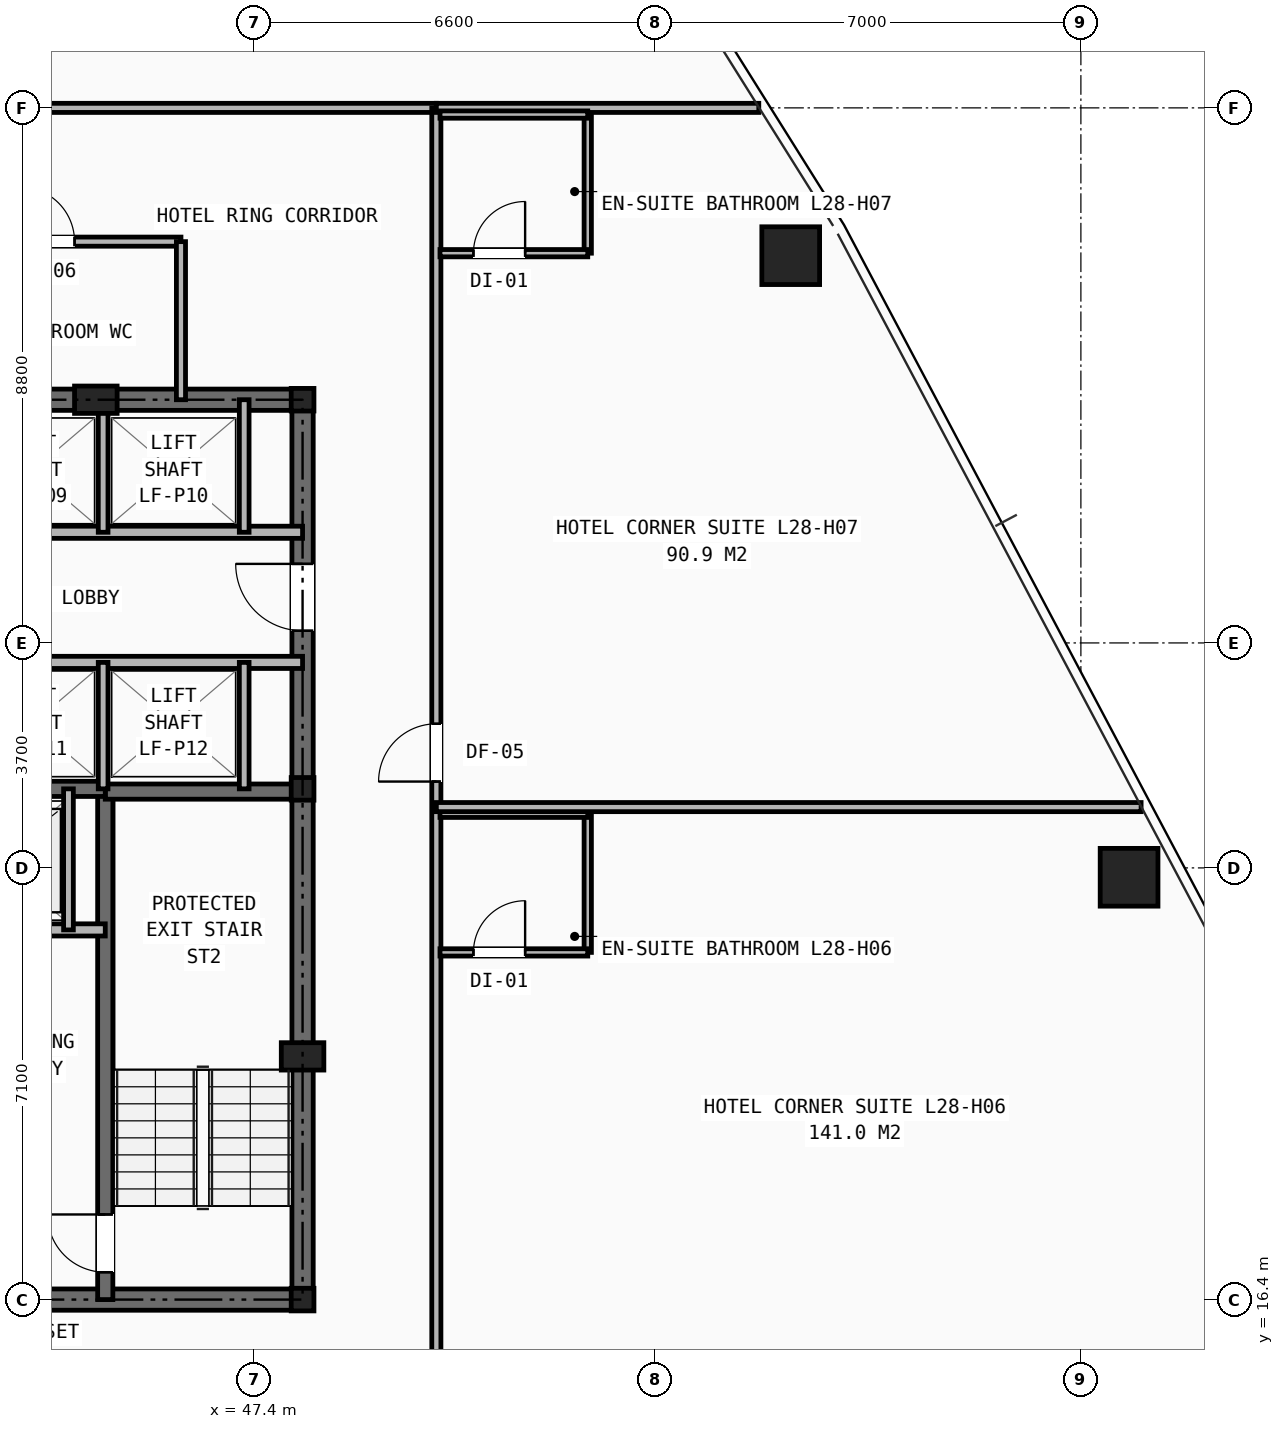
"""IFC4 building model, lengths in metres.
Left out: names, types, materials, properties, quantities, classifications, styles, units other than length and angle.
Written with IfcOpenShell. Run it as: python <this file> out.ifc"""

import sys

from ifc_helpers import new_model, si_unit, direction, frame, frame_2d, origin, origin_2d, place, context, subcontext, project, spatial, rectangle, hollow_rectangle, i_section, extrude, element, fill, save


model = new_model("IFC4")
c1 = context("Model", 3, precision=1e-05, world=origin(), true_north=direction((0.0, 1.0)))
c2 = subcontext(c1, "Body", "Model", "MODEL_VIEW")
j1 = project(units=[si_unit("LENGTHUNIT", "METRE"), si_unit("PLANEANGLEUNIT", "RADIAN")], contexts=[c1])
p1 = place(None, origin())
s1 = spatial("IfcSite", under=j1, at=p1, CompositionType="ELEMENT")
p2 = place(p1, origin())
s2 = spatial("IfcBuilding", under=s1, at=p2, CompositionType="ELEMENT")
p3 = place(p2, frame((0.0, 0.0, 99.0)))
s3 = spatial("IfcBuildingStorey", under=s2, at=p3, CompositionType="ELEMENT", Elevation=99.0)
for number, where, z_axis, x_axis in (
    (1, (48.2, 16.4, 0.0), (0.0, 0.0, 1.0), (1.0, 0.0, 0.0)),
    (2, (48.2, 24.8, 0.0), (0.0, 0.0, 1.0), (1.0, 0.0, 0.0)),
    (3, (48.2, 31.2, 0.0), (0.0, 0.0, 1.0), (1.0, 0.0, 0.0)),
):
    element("IfcColumn", number, at=place(p3, frame(where, z_axis=z_axis, x_axis=x_axis)), inside=s3, PredefinedType="COLUMN", context=c2, shape_type="SweptSolid", body=[
        extrude(i_section(OverallWidth=0.374, OverallDepth=0.372, WebThickness=0.016, FlangeThickness=0.026, at=origin_2d()), origin(), (0.0, 0.0, 1.0), 3.2),
    ])
for number, where, z_axis, x_axis in (
    (4, (48.2, 20.4, 0.0), (0.0, 0.0, 1.0), (1.0, 0.0, 0.0)),
    (5, (44.8, 31.2, 0.0), (0.0, 0.0, 1.0), (1.0, 0.0, 0.0)),
):
    element("IfcColumn", number, at=place(p3, frame(where, z_axis=z_axis, x_axis=x_axis)), inside=s3, PredefinedType="PILASTER", context=c2, shape_type="SweptSolid", body=[
        extrude(rectangle(XDim=0.7, YDim=0.45, at=origin_2d()), origin(), (0.0, 0.0, 1.0), 3.2),
    ])
for number, where, z_axis, x_axis in (
    (6, (61.792, 23.346, 0.0), (0.0, 0.0, 1.0), (1.0, 0.0, 0.0)),
    (7, (56.228, 33.569, 0.0), (0.0, 0.0, 1.0), (1.0, 0.0, 0.0)),
):
    element("IfcColumn", number, at=place(p3, frame(where, z_axis=z_axis, x_axis=x_axis)), inside=s3, PredefinedType="COLUMN", context=c2, shape_type="SweptSolid", body=[
        extrude(hollow_rectangle(XDim=0.95, YDim=0.95, WallThickness=0.065, at=origin_2d()), origin(), (0.0, 0.0, 1.0), 3.2),
    ])
p4 = place(p3, frame((31.8, 16.4, 0.0), z_axis=(0.0, 0.0, 1.0), x_axis=(1.0, 0.0, 0.0)))
e8 = element("IfcWall", 8, at=p4, inside=s3, PredefinedType="SHEAR", context=c2, shape_type="SweptSolid", body=[
    extrude(rectangle(XDim=16.4, YDim=0.35, at=frame_2d((8.2, 0.0))), origin(), (0.0, 0.0, 1.0), 2.97),
])
p5 = place(p4, frame((4.2, 0.0, 0.0)))
e9 = element("IfcOpeningElement", 9, at=p5, cuts=e8, PredefinedType="OPENING", context=c2, shape_type="SweptSolid", body=[
    extrude(rectangle(XDim=0.95, YDim=2.1, at=frame_2d((0.475, 1.05))), frame((0.0, 0.185, 0.0), z_axis=(0.0, -1.0, 0.0), x_axis=(1.0, 0.0, 0.0)), (0.0, 0.0, 1.0), 0.37),
])
p6 = place(p4, frame((10.6, 0.0, 0.0)))
e10 = element("IfcOpeningElement", 10, at=p6, cuts=e8, PredefinedType="OPENING", context=c2, shape_type="SweptSolid", body=[
    extrude(rectangle(XDim=0.95, YDim=2.1, at=frame_2d((0.475, 1.05))), frame((0.0, 0.185, 0.0), z_axis=(0.0, -1.0, 0.0), x_axis=(1.0, 0.0, 0.0)), (0.0, 0.0, 1.0), 0.37),
])
p7 = place(p3, frame((31.8, 31.2, 0.0), z_axis=(0.0, 0.0, 1.0), x_axis=(1.0, 0.0, 0.0)))
e11 = element("IfcWall", 11, at=p7, inside=s3, PredefinedType="SHEAR", context=c2, shape_type="SweptSolid", body=[
    extrude(rectangle(XDim=16.4, YDim=0.35, at=frame_2d((8.2, 0.0))), origin(), (0.0, 0.0, 1.0), 2.97),
])
p8 = place(p3, frame((48.2, 16.4, 0.0), z_axis=(0.0, 0.0, 1.0), x_axis=(0.0, 1.0, 0.0)))
e12 = element("IfcWall", 12, at=p8, inside=s3, PredefinedType="SHEAR", context=c2, shape_type="SweptSolid", body=[
    extrude(rectangle(XDim=14.8, YDim=0.35, at=frame_2d((7.4, 0.0))), origin(), (0.0, 0.0, 1.0), 2.97),
])
p9 = place(p8, frame((11.0, 0.0, 0.0)))
e13 = element("IfcOpeningElement", 13, at=p9, cuts=e12, PredefinedType="OPENING", context=c2, shape_type="SweptSolid", body=[
    extrude(rectangle(XDim=1.1, YDim=2.15, at=frame_2d((0.55, 1.075))), frame((0.0, 0.185, 0.0), z_axis=(0.0, -1.0, 0.0), x_axis=(1.0, 0.0, 0.0)), (0.0, 0.0, 1.0), 0.37),
])
p10 = place(p3, frame((44.955, 16.4, 0.0), z_axis=(0.0, 0.0, 1.0), x_axis=(0.0, 1.0, 0.0)))
e14 = element("IfcWall", 14, at=p10, inside=s3, PredefinedType="SHEAR", context=c2, shape_type="SweptSolid", body=[
    extrude(rectangle(XDim=8.4, YDim=0.25, at=frame_2d((4.2, 0.0))), origin(), (0.0, 0.0, 1.0), 2.97),
])
p11 = place(p10, frame((0.45, 0.0, 0.0)))
e15 = element("IfcOpeningElement", 15, at=p11, cuts=e14, PredefinedType="OPENING", context=c2, shape_type="SweptSolid", body=[
    extrude(rectangle(XDim=0.95, YDim=2.1, at=frame_2d((0.475, 1.05))), frame((0.0, 0.135, 0.0), z_axis=(0.0, -1.0, 0.0), x_axis=(1.0, 0.0, 0.0)), (0.0, 0.0, 1.0), 0.27),
])
p12 = place(p3, frame((44.955, 24.755, 0.0), z_axis=(0.0, 0.0, 1.0), x_axis=(1.0, 0.0, 0.0)))
e16 = element("IfcWall", 16, at=p12, inside=s3, PredefinedType="SHEAR", context=c2, shape_type="SweptSolid", body=[
    extrude(rectangle(XDim=3.245, YDim=0.25, at=frame_2d((1.623, 0.0))), origin(), (0.0, 0.0, 1.0), 2.97),
])
p13 = place(p3, frame((35.045, 24.8, 0.0), z_axis=(0.0, 0.0, 1.0), x_axis=(1.0, 0.0, 0.0)))
e17 = element("IfcWall", 17, at=p13, inside=s3, PredefinedType="SHEAR", context=c2, shape_type="SweptSolid", body=[
    extrude(rectangle(XDim=9.91, YDim=0.25, at=frame_2d((4.955, 0.0))), origin(), (0.0, 0.0, 1.0), 2.97),
])
p14 = place(p3, frame((35.045, 22.48, 0.0), z_axis=(0.0, 0.0, 1.0), x_axis=(1.0, 0.0, 0.0)))
e18 = element("IfcWall", 18, at=p14, inside=s3, PredefinedType="SOLIDWALL", context=c2, shape_type="SweptSolid", body=[
    extrude(rectangle(XDim=9.91, YDim=0.2, at=frame_2d((4.955, 0.0))), origin(), (0.0, 0.0, 1.0), 2.97),
])
p15 = place(p14, frame((1.255, 0.0, 0.0)))
e19 = element("IfcOpeningElement", 19, at=p15, cuts=e18, PredefinedType="OPENING", context=c2, shape_type="SweptSolid", body=[
    extrude(rectangle(XDim=1.1, YDim=2.15, at=frame_2d((0.55, 1.075))), frame((0.0, 0.11, 0.0), z_axis=(0.0, -1.0, 0.0), x_axis=(1.0, 0.0, 0.0)), (0.0, 0.0, 1.0), 0.22),
])
p16 = place(p14, frame((7.555, 0.0, 0.0)))
e20 = element("IfcOpeningElement", 20, at=p16, cuts=e18, PredefinedType="OPENING", context=c2, shape_type="SweptSolid", body=[
    extrude(rectangle(XDim=1.1, YDim=2.15, at=frame_2d((0.55, 1.075))), frame((0.0, 0.11, 0.0), z_axis=(0.0, -1.0, 0.0), x_axis=(1.0, 0.0, 0.0)), (0.0, 0.0, 1.0), 0.22),
])
p17 = place(p14, frame((4.405, 0.0, 0.0)))
e21 = element("IfcOpeningElement", 21, at=p17, cuts=e18, PredefinedType="OPENING", context=c2, shape_type="SweptSolid", body=[
    extrude(rectangle(XDim=1.1, YDim=2.15, at=frame_2d((0.55, 1.075))), frame((0.0, 0.11, 0.0), z_axis=(0.0, -1.0, 0.0), x_axis=(1.0, 0.0, 0.0)), (0.0, 0.0, 1.0), 0.22),
])
p18 = place(p3, frame((44.35, 22.48, 0.0), z_axis=(0.0, 0.0, 1.0), x_axis=(0.0, 1.0, 0.0)))
e22 = element("IfcWall", 22, at=p18, inside=s3, PredefinedType="SOLIDWALL", context=c2, shape_type="SweptSolid", body=[
    extrude(rectangle(XDim=2.32, YDim=0.16, at=frame_2d((1.16, 0.0))), origin(), (0.0, 0.0, 1.0), 2.97),
])
p19 = place(p3, frame((33.82, 29.02, 0.0), z_axis=(0.0, 0.0, 1.0), x_axis=(1.0, 0.0, 0.0)))
e23 = element("IfcWall", 23, at=p19, inside=s3, PredefinedType="SOLIDWALL", context=c2, shape_type="SweptSolid", body=[
    extrude(rectangle(XDim=14.38, YDim=0.2, at=frame_2d((7.19, 0.0))), origin(), (0.0, 0.0, 1.0), 2.421),
])
p20 = place(p19, frame((0.53, 0.0, 0.0)))
e24 = element("IfcOpeningElement", 24, at=p20, cuts=e23, PredefinedType="OPENING", context=c2, shape_type="SweptSolid", body=[
    extrude(rectangle(XDim=1.1, YDim=2.15, at=frame_2d((0.55, 1.075))), frame((0.0, 0.11, 0.0), z_axis=(0.0, -1.0, 0.0), x_axis=(1.0, 0.0, 0.0)), (0.0, 0.0, 1.0), 0.22),
])
p21 = place(p19, frame((2.69, 0.0, 0.0)))
e25 = element("IfcOpeningElement", 25, at=p21, cuts=e23, PredefinedType="OPENING", context=c2, shape_type="SweptSolid", body=[
    extrude(rectangle(XDim=1.1, YDim=2.15, at=frame_2d((0.55, 1.075))), frame((0.0, 0.11, 0.0), z_axis=(0.0, -1.0, 0.0), x_axis=(1.0, 0.0, 0.0)), (0.0, 0.0, 1.0), 0.22),
])
p22 = place(p19, frame((4.85, 0.0, 0.0)))
e26 = element("IfcOpeningElement", 26, at=p22, cuts=e23, PredefinedType="OPENING", context=c2, shape_type="SweptSolid", body=[
    extrude(rectangle(XDim=1.1, YDim=2.15, at=frame_2d((0.55, 1.075))), frame((0.0, 0.11, 0.0), z_axis=(0.0, -1.0, 0.0), x_axis=(1.0, 0.0, 0.0)), (0.0, 0.0, 1.0), 0.22),
])
p23 = place(p19, frame((7.01, 0.0, 0.0)))
e27 = element("IfcOpeningElement", 27, at=p23, cuts=e23, PredefinedType="OPENING", context=c2, shape_type="SweptSolid", body=[
    extrude(rectangle(XDim=1.1, YDim=2.15, at=frame_2d((0.55, 1.075))), frame((0.0, 0.11, 0.0), z_axis=(0.0, -1.0, 0.0), x_axis=(1.0, 0.0, 0.0)), (0.0, 0.0, 1.0), 0.22),
])
p24 = place(p3, frame((33.82, 26.88, 0.0), z_axis=(0.0, 0.0, 1.0), x_axis=(1.0, 0.0, 0.0)))
e28 = element("IfcWall", 28, at=p24, inside=s3, PredefinedType="SOLIDWALL", context=c2, shape_type="SweptSolid", body=[
    extrude(rectangle(XDim=14.38, YDim=0.2, at=frame_2d((7.19, 0.0))), origin(), (0.0, 0.0, 1.0), 2.421),
])
for number, where, z_axis, x_axis in (
    (29, (44.92, 29.02, 0.0), (0.0, 0.0, 1.0), (0.0, 1.0, 0.0)),
    (30, (47.24, 29.02, 0.0), (0.0, 0.0, 1.0), (0.0, 1.0, 0.0)),
):
    element("IfcWall", number, at=place(p3, frame(where, z_axis=z_axis, x_axis=x_axis)), inside=s3, PredefinedType="SOLIDWALL", context=c2, shape_type="SweptSolid", body=[
        extrude(rectangle(XDim=2.18, YDim=0.16, at=frame_2d((1.09, 0.0))), origin(), (0.0, 0.0, 1.0), 2.421),
    ])
for number, where, z_axis, x_axis in (
    (31, (44.92, 24.8, 0.0), (0.0, 0.0, 1.0), (0.0, 1.0, 0.0)),
    (32, (47.24, 24.8, 0.0), (0.0, 0.0, 1.0), (0.0, 1.0, 0.0)),
):
    element("IfcWall", number, at=place(p3, frame(where, z_axis=z_axis, x_axis=x_axis)), inside=s3, PredefinedType="SOLIDWALL", context=c2, shape_type="SweptSolid", body=[
        extrude(rectangle(XDim=2.08, YDim=0.16, at=frame_2d((1.04, 0.0))), origin(), (0.0, 0.0, 1.0), 2.97),
    ])
p25 = place(p3, frame((33.2, 33.8, 0.0), z_axis=(0.0, 0.0, 1.0), x_axis=(1.0, 0.0, 0.0)))
e33 = element("IfcWall", 33, at=p25, inside=s3, PredefinedType="PARTITIONING", context=c2, shape_type="SweptSolid", body=[
    extrude(rectangle(XDim=13.0, YDim=0.15, at=frame_2d((6.5, 0.0))), origin(), (0.0, 0.0, 1.0), 2.97),
])
p26 = place(p25, frame((1.7, 0.0, 0.0)))
e34 = element("IfcOpeningElement", 34, at=p26, cuts=e33, PredefinedType="OPENING", context=c2, shape_type="SweptSolid", body=[
    extrude(rectangle(XDim=0.9, YDim=2.1, at=frame_2d((0.45, 1.05))), frame((0.0, 0.085, 0.0), z_axis=(0.0, -1.0, 0.0), x_axis=(1.0, 0.0, 0.0)), (0.0, 0.0, 1.0), 0.17),
])
p27 = place(p25, frame((6.0, 0.0, 0.0)))
e35 = element("IfcOpeningElement", 35, at=p27, cuts=e33, PredefinedType="OPENING", context=c2, shape_type="SweptSolid", body=[
    extrude(rectangle(XDim=0.9, YDim=2.1, at=frame_2d((0.45, 1.05))), frame((0.0, 0.085, 0.0), z_axis=(0.0, -1.0, 0.0), x_axis=(1.0, 0.0, 0.0)), (0.0, 0.0, 1.0), 0.17),
])
p28 = place(p25, frame((10.35, 0.0, 0.0)))
e36 = element("IfcOpeningElement", 36, at=p28, cuts=e33, PredefinedType="OPENING", context=c2, shape_type="SweptSolid", body=[
    extrude(rectangle(XDim=0.9, YDim=2.1, at=frame_2d((0.45, 1.05))), frame((0.0, 0.085, 0.0), z_axis=(0.0, -1.0, 0.0), x_axis=(1.0, 0.0, 0.0)), (0.0, 0.0, 1.0), 0.17),
])
p29 = place(p3, frame((46.2, 31.2, 0.0), z_axis=(0.0, 0.0, 1.0), x_axis=(0.0, 1.0, 0.0)))
e37 = element("IfcWall", 37, at=p29, inside=s3, PredefinedType="PARTITIONING", context=c2, shape_type="SweptSolid", body=[
    extrude(rectangle(XDim=2.6, YDim=0.15, at=frame_2d((1.3, 0.0))), origin(), (0.0, 0.0, 1.0), 2.421),
])
p30 = place(p3, frame((40.75, 36.0, 0.0), z_axis=(0.0, 0.0, 1.0), x_axis=(1.0, 0.0, 0.0)))
e38 = element("IfcWall", 38, at=p30, inside=s3, PredefinedType="PARTITIONING", context=c2, shape_type="SweptSolid", body=[
    extrude(rectangle(XDim=9.65, YDim=0.15, at=frame_2d((4.825, 0.0))), origin(), (0.0, 0.0, 1.0), 2.503),
])
p31 = place(p3, frame((50.4, 14.1, 0.0), z_axis=(0.0, 0.0, 1.0), x_axis=(0.0, 1.0, 0.0)))
e39 = element("IfcWall", 39, at=p31, inside=s3, PredefinedType="PARTITIONING", context=c2, shape_type="SweptSolid", body=[
    extrude(rectangle(XDim=21.9, YDim=0.15, at=frame_2d((10.95, 0.0))), origin(), (0.0, 0.0, 1.0), 2.181),
])
p32 = place(p31, frame((0.42, 0.0, 0.0)))
e40 = element("IfcOpeningElement", 40, at=p32, cuts=e39, PredefinedType="OPENING", context=c2, shape_type="SweptSolid", body=[
    extrude(rectangle(XDim=0.95, YDim=2.1, at=frame_2d((0.475, 1.05))), frame((0.0, 0.085, 0.0), z_axis=(0.0, -1.0, 0.0), x_axis=(1.0, 0.0, 0.0)), (0.0, 0.0, 1.0), 0.17),
])
p33 = place(p31, frame((10.82, 0.0, 0.0)))
e41 = element("IfcOpeningElement", 41, at=p33, cuts=e39, PredefinedType="OPENING", context=c2, shape_type="SweptSolid", body=[
    extrude(rectangle(XDim=0.95, YDim=2.1, at=frame_2d((0.475, 1.05))), frame((0.0, 0.085, 0.0), z_axis=(0.0, -1.0, 0.0), x_axis=(1.0, 0.0, 0.0)), (0.0, 0.0, 1.0), 0.17),
])
p34 = place(p3, frame((50.4, 36.0, 0.0), z_axis=(0.0, 0.0, 1.0), x_axis=(1.0, 0.0, 0.0)))
e42 = element("IfcWall", 42, at=p34, inside=s3, PredefinedType="PARTITIONING", context=c2, shape_type="SweptSolid", body=[
    extrude(rectangle(XDim=5.303, YDim=0.15, at=frame_2d((2.651, 0.0))), origin(), (0.0, 0.0, 1.0), 2.258),
])
p35 = place(p3, frame((52.89, 22.11, 0.0), z_axis=(0.0, 0.0, 1.0), x_axis=(0.0, 1.0, 0.0)))
e43 = element("IfcWall", 43, at=p35, inside=s3, PredefinedType="PARTITIONING", context=c2, shape_type="SweptSolid", body=[
    extrude(rectangle(XDim=2.28, YDim=0.12, at=frame_2d((1.14, 0.0))), origin(), (0.0, 0.0, 1.0), 2.97),
])
p36 = place(p3, frame((50.46, 22.11, 0.0), z_axis=(0.0, 0.0, 1.0), x_axis=(1.0, 0.0, 0.0)))
e44 = element("IfcWall", 44, at=p36, inside=s3, PredefinedType="PARTITIONING", context=c2, shape_type="SweptSolid", body=[
    extrude(rectangle(XDim=2.43, YDim=0.12, at=frame_2d((1.215, 0.0))), origin(), (0.0, 0.0, 1.0), 2.97),
])
p37 = place(p36, frame((0.55, 0.0, 0.0)))
e45 = element("IfcOpeningElement", 45, at=p37, cuts=e44, PredefinedType="OPENING", context=c2, shape_type="SweptSolid", body=[
    extrude(rectangle(XDim=0.85, YDim=2.05, at=frame_2d((0.425, 1.025))), frame((0.0, 0.07, 0.0), z_axis=(0.0, -1.0, 0.0), x_axis=(1.0, 0.0, 0.0)), (0.0, 0.0, 1.0), 0.14),
])
p38 = place(p3, frame((50.46, 24.39, 0.0), z_axis=(0.0, 0.0, 1.0), x_axis=(1.0, 0.0, 0.0)))
e46 = element("IfcWall", 46, at=p38, inside=s3, PredefinedType="PARTITIONING", context=c2, shape_type="SweptSolid", body=[
    extrude(rectangle(XDim=2.43, YDim=0.12, at=frame_2d((1.215, 0.0))), origin(), (0.0, 0.0, 1.0), 2.97),
])
p39 = place(p3, frame((50.4, 24.5, 0.0), z_axis=(0.0, 0.0, 1.0), x_axis=(1.0, 0.0, 0.0)))
e47 = element("IfcWall", 47, at=p39, inside=s3, PredefinedType="PARTITIONING", context=c2, shape_type="SweptSolid", body=[
    extrude(rectangle(XDim=11.59, YDim=0.15, at=frame_2d((5.795, 0.0))), origin(), (0.0, 0.0, 1.0), 2.258),
])
p40 = place(p3, frame((52.89, 33.61, 0.0), z_axis=(0.0, 0.0, 1.0), x_axis=(0.0, 1.0, 0.0)))
e48 = element("IfcWall", 48, at=p40, inside=s3, PredefinedType="PARTITIONING", context=c2, shape_type="SweptSolid", body=[
    extrude(rectangle(XDim=2.28, YDim=0.12, at=frame_2d((1.14, 0.0))), origin(), (0.0, 0.0, 1.0), 2.97),
])
p41 = place(p3, frame((50.46, 33.61, 0.0), z_axis=(0.0, 0.0, 1.0), x_axis=(1.0, 0.0, 0.0)))
e49 = element("IfcWall", 49, at=p41, inside=s3, PredefinedType="PARTITIONING", context=c2, shape_type="SweptSolid", body=[
    extrude(rectangle(XDim=2.43, YDim=0.12, at=frame_2d((1.215, 0.0))), origin(), (0.0, 0.0, 1.0), 2.503),
])
p42 = place(p41, frame((0.55, 0.0, 0.0)))
e50 = element("IfcOpeningElement", 50, at=p42, cuts=e49, PredefinedType="OPENING", context=c2, shape_type="SweptSolid", body=[
    extrude(rectangle(XDim=0.85, YDim=2.05, at=frame_2d((0.425, 1.025))), frame((0.0, 0.07, 0.0), z_axis=(0.0, -1.0, 0.0), x_axis=(1.0, 0.0, 0.0)), (0.0, 0.0, 1.0), 0.14),
])
p43 = place(p3, frame((50.46, 35.89, 0.0), z_axis=(0.0, 0.0, 1.0), x_axis=(1.0, 0.0, 0.0)))
e51 = element("IfcWall", 51, at=p43, inside=s3, PredefinedType="PARTITIONING", context=c2, shape_type="SweptSolid", body=[
    extrude(rectangle(XDim=2.43, YDim=0.12, at=frame_2d((1.215, 0.0))), origin(), (0.0, 0.0, 1.0), 2.97),
])
p44 = place(p11, origin())
e52 = element("IfcDoor", 52, at=p44, inside=s3, OperationType="SINGLE_SWING_RIGHT", PredefinedType="DOOR", context=c2, shape_type="SweptSolid", body=[
    extrude(rectangle(XDim=0.95, YDim=2.1, at=frame_2d((0.475, 1.05))), frame((0.0, 0.025, 0.0), z_axis=(0.0, -1.0, 0.0), x_axis=(1.0, 0.0, 0.0)), (0.0, 0.0, 1.0), 0.05),
])
fill(e15, e52)
p45 = place(p9, origin())
e53 = element("IfcDoor", 53, at=p45, inside=s3, OperationType="SINGLE_SWING_RIGHT", PredefinedType="DOOR", context=c2, shape_type="SweptSolid", body=[
    extrude(rectangle(XDim=1.1, YDim=2.15, at=frame_2d((0.55, 1.075))), frame((0.0, 0.025, 0.0), z_axis=(0.0, -1.0, 0.0), x_axis=(1.0, 0.0, 0.0)), (0.0, 0.0, 1.0), 0.05),
])
fill(e13, e53)
p46 = place(p28, origin())
e54 = element("IfcDoor", 54, at=p46, inside=s3, OperationType="SINGLE_SWING_LEFT", PredefinedType="DOOR", context=c2, shape_type="SweptSolid", body=[
    extrude(rectangle(XDim=0.9, YDim=2.1, at=frame_2d((0.45, 1.05))), frame((0.0, 0.025, 0.0), z_axis=(0.0, -1.0, 0.0), x_axis=(1.0, 0.0, 0.0)), (0.0, 0.0, 1.0), 0.05),
])
fill(e36, e54)
p47 = place(p37, origin())
e55 = element("IfcDoor", 55, at=p47, inside=s3, OperationType="SINGLE_SWING_RIGHT", PredefinedType="DOOR", context=c2, shape_type="SweptSolid", body=[
    extrude(rectangle(XDim=0.85, YDim=2.05, at=frame_2d((0.425, 1.025))), frame((0.0, 0.025, 0.0), z_axis=(0.0, -1.0, 0.0), x_axis=(1.0, 0.0, 0.0)), (0.0, 0.0, 1.0), 0.05),
])
fill(e45, e55)
p48 = place(p33, origin())
e56 = element("IfcDoor", 56, at=p48, inside=s3, OperationType="SINGLE_SWING_LEFT", PredefinedType="DOOR", context=c2, shape_type="SweptSolid", body=[
    extrude(rectangle(XDim=0.95, YDim=2.1, at=frame_2d((0.475, 1.05))), frame((0.0, 0.025, 0.0), z_axis=(0.0, -1.0, 0.0), x_axis=(1.0, 0.0, 0.0)), (0.0, 0.0, 1.0), 0.05),
])
fill(e41, e56)
p49 = place(p42, origin())
e57 = element("IfcDoor", 57, at=p49, inside=s3, OperationType="SINGLE_SWING_RIGHT", PredefinedType="DOOR", context=c2, shape_type="SweptSolid", body=[
    extrude(rectangle(XDim=0.85, YDim=2.05, at=frame_2d((0.425, 1.025))), frame((0.0, 0.025, 0.0), z_axis=(0.0, -1.0, 0.0), x_axis=(1.0, 0.0, 0.0)), (0.0, 0.0, 1.0), 0.05),
])
fill(e50, e57)
save(model, sys.argv[1])
